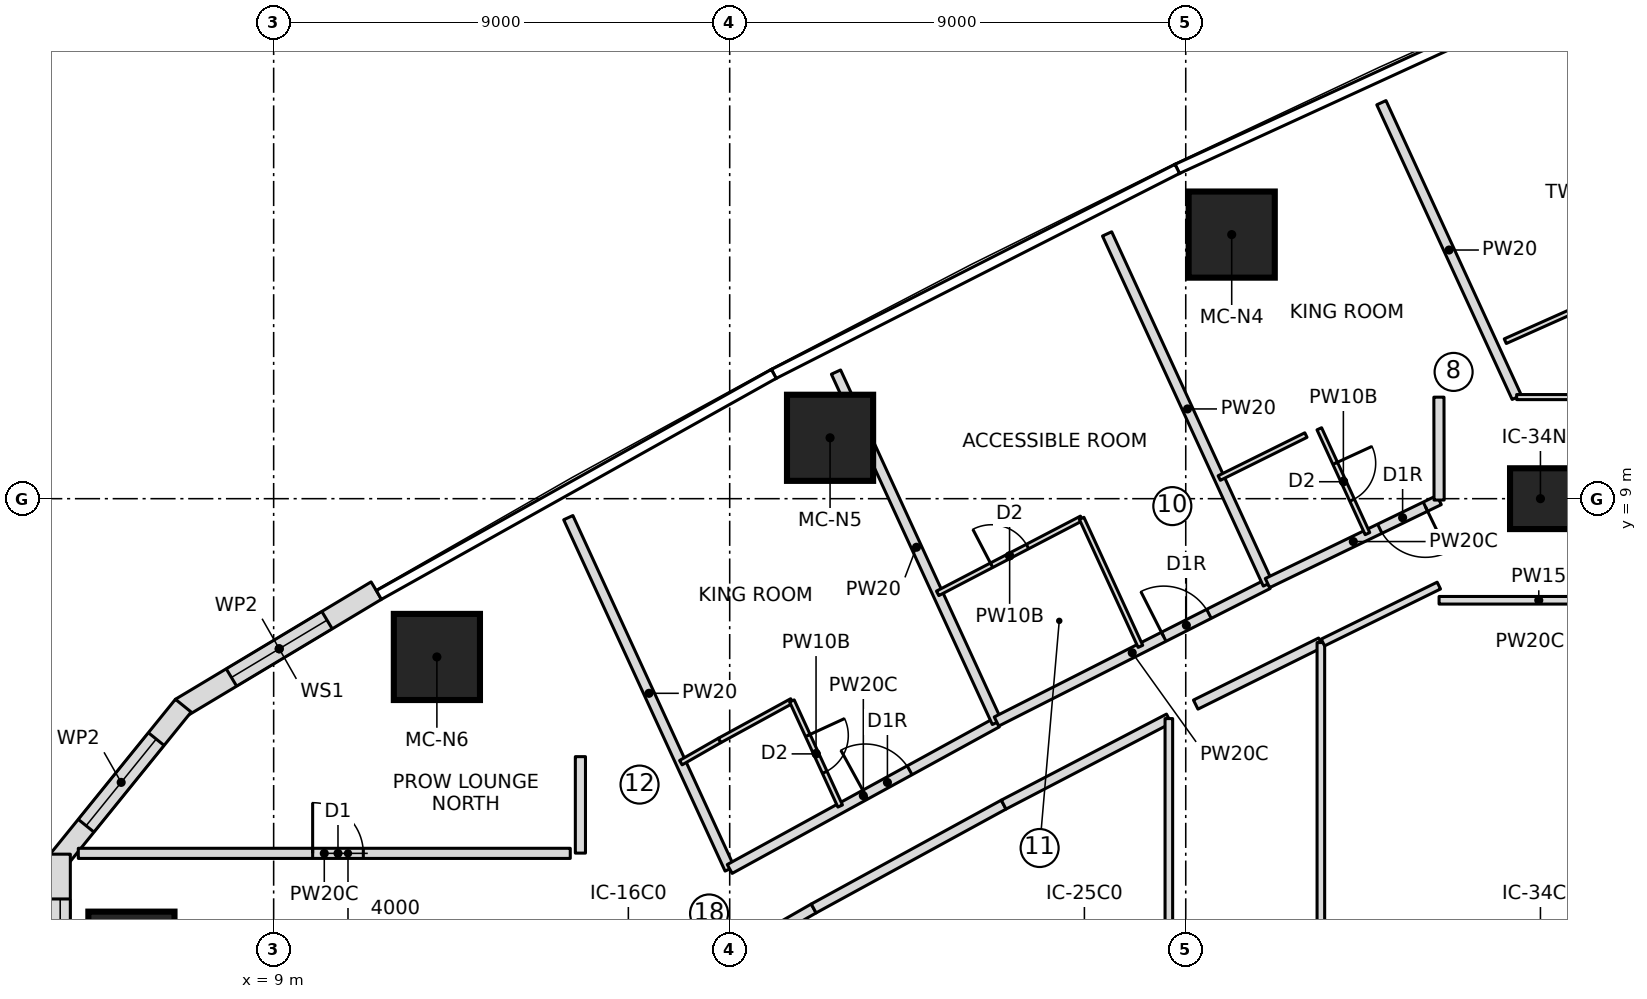
"""IFC4 building model, lengths in metres.
Left out: names, types, materials, properties, quantities, classifications, styles, units other than length and angle.
Written with IfcOpenShell. Run it as: python <this file> out.ifc"""

import sys

from ifc_helpers import new_model, si_unit, direction, frame, frame_2d, origin, origin_2d, place, context, subcontext, project, spatial, polyline, rectangle, outline, extrude, element, fill, save


model = new_model("IFC4")
c1 = context("Model", 3, precision=1e-05, world=origin(), true_north=direction((0.0, 1.0)))
c2 = subcontext(c1, "Body", "Model", "MODEL_VIEW")
j1 = project(units=[si_unit("LENGTHUNIT", "METRE"), si_unit("PLANEANGLEUNIT", "RADIAN")], contexts=[c1])
p1 = place(None, origin())
s1 = spatial("IfcSite", under=j1, at=p1, CompositionType="ELEMENT")
p2 = place(p1, origin())
s2 = spatial("IfcBuilding", under=s1, at=p2, CompositionType="ELEMENT")
p3 = place(p2, frame((0.0, 0.0, 106.2)))
s3 = spatial("IfcBuildingStorey", under=s2, at=p3, CompositionType="ELEMENT", Elevation=106.2)
for number, where, z_axis, x_axis in (
    (1, (6.193, 0.0, 0.0), (0.0, 0.0, 1.0), (1.0, 0.0, 0.0)),
    (2, (27.907, 14.212, 0.0), (0.0, 0.0, 1.0), (1.0, 0.0, 0.0)),
    (3, (19.981, 10.202, 0.0), (0.0, 0.0, 1.0), (1.0, 0.0, 0.0)),
    (4, (12.221, 5.876, 0.0), (0.0, 0.0, 1.0), (1.0, 0.0, 0.0)),
):
    element("IfcColumn", number, at=place(p3, frame(where, z_axis=z_axis, x_axis=x_axis)), inside=s3, PredefinedType="COLUMN", context=c2, shape_type="SweptSolid", body=[
        extrude(rectangle(XDim=1.7, YDim=1.7, at=origin_2d()), origin(), (0.0, 0.0, 1.0), 3.55),
    ])
p4 = place(p3, frame((34.0, 9.0, 0.0), z_axis=(0.0, 0.0, 1.0), x_axis=(1.0, 0.0, 0.0)))
e5 = element("IfcColumn", 5, at=p4, inside=s3, PredefinedType="COLUMN", context=c2, shape_type="SweptSolid", body=[
    extrude(rectangle(XDim=1.2, YDim=1.2, at=origin_2d()), origin(), (0.0, 0.0, 1.0), 3.55),
])
p5 = place(p3, frame((11.026, 7.186, 0.0), z_axis=(0.0, 0.0, 1.0), x_axis=(-0.857550776474, -0.514399325202, 0.0)))
e6 = element("IfcWall", 6, at=p5, inside=s3, PredefinedType="NOTDEFINED", context=c2, shape_type="SweptSolid", body=[
    extrude(outline(polyline([(0.0, -0.2), (4.503, -0.2), (4.433, 0.2), (0.0, 0.2), (0.0, -0.2)])), origin(), (0.0, 0.0, 1.0), 3.25),
])
p6 = place(p5, frame((1.134, 0.0, 0.6)))
e7 = element("IfcOpeningElement", 7, at=p6, cuts=e6, PredefinedType="OPENING", context=c2, shape_type="SweptSolid", body=[
    extrude(outline(polyline([(0.0, 1.35), (0.084, 1.771), (0.322, 2.128), (0.679, 2.366), (1.1, 2.45), (1.521, 2.366), (1.878, 2.128), (2.116, 1.771), (2.2, 1.35), (2.2, 1.1), (2.116, 0.679), (1.878, 0.322), (1.521, 0.084), (1.1, 0.0), (0.679, 0.084), (0.322, 0.322), (0.084, 0.679), (0.0, 1.1), (0.0, 1.35)])), frame((0.0, 0.21, 0.0), z_axis=(0.0, -1.0, 0.0), x_axis=(1.0, 0.0, 0.0)), (0.0, 0.0, 1.0), 0.42),
])
p7 = place(p3, frame((7.194, 4.888, 0.0), z_axis=(0.0, 0.0, 1.0), x_axis=(-0.62903486133, -0.777377092042, 0.0)))
e8 = element("IfcWall", 8, at=p7, inside=s3, PredefinedType="NOTDEFINED", context=c2, shape_type="SweptSolid", body=[
    extrude(outline(polyline([(-0.035, -0.2), (3.897, -0.2), (3.756, 0.2), (0.035, 0.2), (-0.035, -0.2)])), origin(), (0.0, 0.0, 1.0), 3.25),
])
p8 = place(p7, frame((0.813, 0.0, 0.6)))
e9 = element("IfcOpeningElement", 9, at=p8, cuts=e8, PredefinedType="OPENING", context=c2, shape_type="SweptSolid", body=[
    extrude(outline(polyline([(0.0, 1.35), (0.084, 1.771), (0.322, 2.128), (0.679, 2.366), (1.1, 2.45), (1.521, 2.366), (1.878, 2.128), (2.116, 1.771), (2.2, 1.35), (2.2, 1.1), (2.116, 0.679), (1.878, 0.322), (1.521, 0.084), (1.1, 0.0), (0.679, 0.084), (0.322, 0.322), (0.084, 0.679), (0.0, 1.1), (0.0, 1.35)])), frame((0.0, 0.21, 0.0), z_axis=(0.0, -1.0, 0.0), x_axis=(1.0, 0.0, 0.0)), (0.0, 0.0, 1.0), 0.42),
])
p9 = place(p3, frame((4.787, 1.913, 0.0), z_axis=(0.0, 0.0, 1.0), x_axis=(0.0, -1.0, 0.0)))
e10 = element("IfcWall", 10, at=p9, inside=s3, PredefinedType="NOTDEFINED", context=c2, shape_type="SweptSolid", body=[
    extrude(outline(polyline([(-0.071, -0.2), (3.897, -0.2), (3.755, 0.2), (0.071, 0.2), (-0.071, -0.2)])), origin(), (0.0, 0.0, 1.0), 3.25),
])
p10 = place(p9, frame((0.813, 0.0, 0.6)))
e11 = element("IfcOpeningElement", 11, at=p10, cuts=e10, PredefinedType="OPENING", context=c2, shape_type="SweptSolid", body=[
    extrude(outline(polyline([(0.0, 1.35), (0.084, 1.771), (0.322, 2.128), (0.679, 2.366), (1.1, 2.45), (1.521, 2.366), (1.878, 2.128), (2.116, 1.771), (2.2, 1.35), (2.2, 1.1), (2.116, 0.679), (1.878, 0.322), (1.521, 0.084), (1.1, 0.0), (0.679, 0.084), (0.322, 0.322), (0.084, 0.679), (0.0, 1.1), (0.0, 1.35)])), frame((0.0, 0.21, 0.0), z_axis=(0.0, -1.0, 0.0), x_axis=(1.0, 0.0, 0.0)), (0.0, 0.0, 1.0), 0.42),
])
p11 = place(p3, frame((5.145, 2.0, 0.0), z_axis=(0.0, 0.0, 1.0), x_axis=(1.0, 0.0, 0.0)))
e12 = element("IfcWall", 12, at=p11, inside=s3, PredefinedType="PARTITIONING", context=c2, shape_type="SweptSolid", body=[
    extrude(rectangle(XDim=9.709, YDim=0.2, at=frame_2d((4.854, 0.0))), origin(), (0.0, 0.0, 1.0), 3.25),
])
p12 = place(p11, frame((4.625, 0.0, 0.0)))
e13 = element("IfcOpeningElement", 13, at=p12, cuts=e12, PredefinedType="OPENING", context=c2, shape_type="SweptSolid", body=[
    extrude(rectangle(XDim=1.0, YDim=2.1, at=frame_2d((0.5, 1.05))), frame((0.0, 0.11, 0.0), z_axis=(0.0, -1.0, 0.0), x_axis=(1.0, 0.0, 0.0)), (0.0, 0.0, 1.0), 0.22),
])
p13 = place(p3, frame((14.815, 8.626, 0.0), z_axis=(0.0, 0.0, 1.0), x_axis=(0.417432341259, -0.908708006166, 0.0)))
e14 = element("IfcWall", 14, at=p13, inside=s3, PredefinedType="PARTITIONING", context=c2, shape_type="SweptSolid", body=[
    extrude(rectangle(XDim=7.631, YDim=0.2, at=frame_2d((3.815, 0.0))), origin(), (0.0, 0.0, 1.0), 3.25),
])
p14 = place(p3, frame((18.0, 1.692, 0.0), z_axis=(0.0, 0.0, 1.0), x_axis=(0.876809096721, 0.480838650597, 0.0)))
e15 = element("IfcWall", 15, at=p14, inside=s3, PredefinedType="PARTITIONING", context=c2, shape_type="SweptSolid", body=[
    extrude(rectangle(XDim=6.015, YDim=0.2, at=frame_2d((3.008, 0.0))), origin(), (0.0, 0.0, 1.0), 3.25),
])
p15 = place(p14, frame((3.05, 0.0, 0.0)))
e16 = element("IfcOpeningElement", 16, at=p15, cuts=e15, PredefinedType="OPENING", context=c2, shape_type="SweptSolid", body=[
    extrude(rectangle(XDim=1.0, YDim=2.1, at=frame_2d((0.5, 1.05))), frame((0.0, 0.11, 0.0), z_axis=(0.0, -1.0, 0.0), x_axis=(1.0, 0.0, 0.0)), (0.0, 0.0, 1.0), 0.22),
])
p16 = place(p3, frame((17.036, 3.79, 0.0), z_axis=(0.0, 0.0, 1.0), x_axis=(0.867629162742, 0.497211862248, 0.0)))
e17 = element("IfcWall", 17, at=p16, inside=s3, PredefinedType="PARTITIONING", context=c2, shape_type="SweptSolid", body=[
    extrude(rectangle(XDim=0.882, YDim=0.1, at=frame_2d((0.441, 0.0))), origin(), (0.0, 0.0, 1.0), 3.25),
])
p17 = place(p3, frame((17.801, 4.229, 0.0), z_axis=(0.0, 0.0, 1.0), x_axis=(0.877424481957, 0.479714788663, 0.0)))
e18 = element("IfcWall", 18, at=p17, inside=s3, PredefinedType="PARTITIONING", context=c2, shape_type="SweptSolid", body=[
    extrude(rectangle(XDim=1.625, YDim=0.1, at=frame_2d((0.813, 0.0))), origin(), (0.0, 0.0, 1.0), 3.25),
])
p18 = place(p3, frame((19.228, 5.008, 0.0), z_axis=(0.0, 0.0, 1.0), x_axis=(0.417450047292, -0.908699872354, 0.0)))
e19 = element("IfcWall", 19, at=p18, inside=s3, PredefinedType="PARTITIONING", context=c2, shape_type="SweptSolid", body=[
    extrude(rectangle(XDim=2.283, YDim=0.1, at=frame_2d((1.141, 0.0))), origin(), (0.0, 0.0, 1.0), 3.25),
])
p19 = place(p18, frame((0.75, 0.0, 0.0)))
e20 = element("IfcOpeningElement", 20, at=p19, cuts=e19, PredefinedType="OPENING", context=c2, shape_type="SweptSolid", body=[
    extrude(rectangle(XDim=0.8, YDim=2.1, at=frame_2d((0.4, 1.05))), frame((0.0, 0.06, 0.0), z_axis=(0.0, -1.0, 0.0), x_axis=(1.0, 0.0, 0.0)), (0.0, 0.0, 1.0), 0.12),
])
p20 = place(p3, frame((23.274, 4.584, 0.0), z_axis=(0.0, 0.0, 1.0), x_axis=(-0.417440028355, 0.908704474913, 0.0)))
e21 = element("IfcWall", 21, at=p20, inside=s3, PredefinedType="PARTITIONING", context=c2, shape_type="SweptSolid", body=[
    extrude(rectangle(XDim=7.61, YDim=0.2, at=frame_2d((3.805, 0.0))), origin(), (0.0, 0.0, 1.0), 3.25),
])
p21 = place(p3, frame((23.266, 4.602, 0.0), z_axis=(0.0, 0.0, 1.0), x_axis=(0.892007141151, 0.452021304958, 0.0)))
e22 = element("IfcWall", 22, at=p21, inside=s3, PredefinedType="PARTITIONING", context=c2, shape_type="SweptSolid", body=[
    extrude(rectangle(XDim=6.004, YDim=0.2, at=frame_2d((3.002, 0.0))), origin(), (0.0, 0.0, 1.0), 3.25),
])
p22 = place(p21, frame((3.7, 0.0, 0.0)))
e23 = element("IfcOpeningElement", 23, at=p22, cuts=e22, PredefinedType="OPENING", context=c2, shape_type="SweptSolid", body=[
    extrude(rectangle(XDim=1.0, YDim=2.1, at=frame_2d((0.5, 1.05))), frame((0.0, 0.11, 0.0), z_axis=(0.0, -1.0, 0.0), x_axis=(1.0, 0.0, 0.0)), (0.0, 0.0, 1.0), 0.22),
])
p23 = place(p3, frame((22.104, 7.132, 0.0), z_axis=(0.0, 0.0, 1.0), x_axis=(0.886865947566, 0.46202682936, 0.0)))
e24 = element("IfcWall", 24, at=p23, inside=s3, PredefinedType="PARTITIONING", context=c2, shape_type="SweptSolid", body=[
    extrude(rectangle(XDim=3.204, YDim=0.1, at=frame_2d((1.602, 0.0))), origin(), (0.0, 0.0, 1.0), 3.25),
])
p24 = place(p23, frame((1.2, 0.0, 0.0)))
e25 = element("IfcOpeningElement", 25, at=p24, cuts=e24, PredefinedType="OPENING", context=c2, shape_type="SweptSolid", body=[
    extrude(rectangle(XDim=0.8, YDim=2.1, at=frame_2d((0.4, 1.05))), frame((0.0, 0.06, 0.0), z_axis=(0.0, -1.0, 0.0), x_axis=(1.0, 0.0, 0.0)), (0.0, 0.0, 1.0), 0.12),
])
p25 = place(p3, frame((24.945, 8.612, 0.0), z_axis=(0.0, 0.0, 1.0), x_axis=(0.417431588167, -0.908708352113, 0.0)))
e26 = element("IfcWall", 26, at=p25, inside=s3, PredefinedType="PARTITIONING", context=c2, shape_type="SweptSolid", body=[
    extrude(rectangle(XDim=2.781, YDim=0.1, at=frame_2d((1.39, 0.0))), origin(), (0.0, 0.0, 1.0), 3.25),
])
p26 = place(p3, frame((28.622, 7.316, 0.0), z_axis=(0.0, 0.0, 1.0), x_axis=(-0.417428513692, 0.908709764422, 0.0)))
e27 = element("IfcWall", 27, at=p26, inside=s3, PredefinedType="PARTITIONING", context=c2, shape_type="SweptSolid", body=[
    extrude(rectangle(XDim=7.603, YDim=0.2, at=frame_2d((3.802, 0.0))), origin(), (0.0, 0.0, 1.0), 3.25),
])
p27 = place(p3, frame((32.0, 8.973, 0.0), z_axis=(0.0, 0.0, 1.0), x_axis=(-0.900216696569, -0.435442188147, 0.0)))
e28 = element("IfcWall", 28, at=p27, inside=s3, PredefinedType="PARTITIONING", context=c2, shape_type="SweptSolid", body=[
    extrude(rectangle(XDim=3.762, YDim=0.2, at=frame_2d((1.881, 0.0))), origin(), (0.0, 0.0, 1.0), 3.25),
])
p28 = place(p27, frame((0.3, 0.0, 0.0)))
e29 = element("IfcOpeningElement", 29, at=p28, cuts=e28, PredefinedType="OPENING", context=c2, shape_type="SweptSolid", body=[
    extrude(rectangle(XDim=1.0, YDim=2.1, at=frame_2d((0.5, 1.05))), frame((0.0, 0.11, 0.0), z_axis=(0.0, -1.0, 0.0), x_axis=(1.0, 0.0, 0.0)), (0.0, 0.0, 1.0), 0.22),
])
p29 = place(p3, frame((27.661, 9.407, 0.0), z_axis=(0.0, 0.0, 1.0), x_axis=(0.895982200486, 0.444089964324, 0.0)))
e30 = element("IfcWall", 30, at=p29, inside=s3, PredefinedType="PARTITIONING", context=c2, shape_type="SweptSolid", body=[
    extrude(rectangle(XDim=1.909, YDim=0.1, at=frame_2d((0.954, 0.0))), origin(), (0.0, 0.0, 1.0), 3.25),
])
p30 = place(p3, frame((29.635, 10.38, 0.0), z_axis=(0.0, 0.0, 1.0), x_axis=(0.417466676952, -0.908692232626, 0.0)))
e31 = element("IfcWall", 31, at=p30, inside=s3, PredefinedType="PARTITIONING", context=c2, shape_type="SweptSolid", body=[
    extrude(rectangle(XDim=2.277, YDim=0.1, at=frame_2d((1.139, 0.0))), origin(), (0.0, 0.0, 1.0), 3.25),
])
p31 = place(p30, frame((0.75, 0.0, 0.0)))
e32 = element("IfcOpeningElement", 32, at=p31, cuts=e31, PredefinedType="OPENING", context=c2, shape_type="SweptSolid", body=[
    extrude(rectangle(XDim=0.8, YDim=2.1, at=frame_2d((0.4, 1.05))), frame((0.0, 0.06, 0.0), z_axis=(0.0, -1.0, 0.0), x_axis=(1.0, 0.0, 0.0)), (0.0, 0.0, 1.0), 0.12),
])
p32 = place(p3, frame((33.532, 11.0, 0.0), z_axis=(0.0, 0.0, 1.0), x_axis=(-0.417441426461, 0.908703832651, 0.0)))
e33 = element("IfcWall", 33, at=p32, inside=s3, PredefinedType="PARTITIONING", context=c2, shape_type="SweptSolid", body=[
    extrude(rectangle(XDim=6.399, YDim=0.2, at=frame_2d((3.2, 0.0))), origin(), (0.0, 0.0, 1.0), 3.25),
])
p33 = place(p3, frame((33.306, 12.108, 0.0), z_axis=(0.0, 0.0, 1.0), x_axis=(0.913060453705, 0.407824236504, 0.0)))
e34 = element("IfcWall", 34, at=p33, inside=s3, PredefinedType="PARTITIONING", context=c2, shape_type="SweptSolid", body=[
    extrude(rectangle(XDim=2.243, YDim=0.1, at=frame_2d((1.122, 0.0))), origin(), (0.0, 0.0, 1.0), 3.25),
])
p34 = place(p3, frame((18.065, 0.0, 0.0), z_axis=(0.0, 0.0, 1.0), x_axis=(0.867694156962, 0.49709843087, 0.0)))
e35 = element("IfcWall", 35, at=p34, inside=s3, PredefinedType="PARTITIONING", context=c2, shape_type="SweptSolid", body=[
    extrude(rectangle(XDim=1.835, YDim=0.2, at=frame_2d((0.918, 0.0))), origin(), (0.0, 0.0, 1.0), 3.25),
])
p35 = place(p3, frame((19.657, 0.912, 0.0), z_axis=(0.0, 0.0, 1.0), x_axis=(0.877465075585, 0.479640533242, 0.0)))
e36 = element("IfcWall", 36, at=p35, inside=s3, PredefinedType="PARTITIONING", context=c2, shape_type="SweptSolid", body=[
    extrude(rectangle(XDim=4.273, YDim=0.2, at=frame_2d((2.137, 0.0))), origin(), (0.0, 0.0, 1.0), 3.25),
])
p36 = place(p3, frame((23.407, 2.962, 0.0), z_axis=(0.0, 0.0, 1.0), x_axis=(0.886891405098, 0.46197796004, 0.0)))
e37 = element("IfcWall", 37, at=p36, inside=s3, PredefinedType="PARTITIONING", context=c2, shape_type="SweptSolid", body=[
    extrude(rectangle(XDim=3.676, YDim=0.2, at=frame_2d((1.838, 0.0))), origin(), (0.0, 0.0, 1.0), 3.25),
])
p37 = place(p3, frame((26.667, -4.66, 0.0), z_axis=(0.0, 0.0, 1.0), x_axis=(0.0, 1.0, 0.0)))
e38 = element("IfcWall", 38, at=p37, inside=s3, PredefinedType="PARTITIONING", context=c2, shape_type="SweptSolid", body=[
    extrude(rectangle(XDim=9.32, YDim=0.15, at=frame_2d((4.66, 0.0))), origin(), (0.0, 0.0, 1.0), 3.25),
])
p38 = place(p3, frame((27.196, 4.936, 0.0), z_axis=(0.0, 0.0, 1.0), x_axis=(0.895945057464, 0.444164895062, 0.0)))
e39 = element("IfcWall", 39, at=p38, inside=s3, PredefinedType="PARTITIONING", context=c2, shape_type="SweptSolid", body=[
    extrude(rectangle(XDim=2.757, YDim=0.2, at=frame_2d((1.378, 0.0))), origin(), (0.0, 0.0, 1.0), 3.25),
])
p39 = place(p3, frame((29.667, -6.16, 0.0), z_axis=(0.0, 0.0, 1.0), x_axis=(0.0, 1.0, 0.0)))
e40 = element("IfcWall", 40, at=p39, inside=s3, PredefinedType="PARTITIONING", context=c2, shape_type="SweptSolid", body=[
    extrude(rectangle(XDim=12.321, YDim=0.15, at=frame_2d((6.16, 0.0))), origin(), (0.0, 0.0, 1.0), 3.25),
])
p40 = place(p3, frame((36.0, 11.005, 0.0), z_axis=(0.0, 0.0, 1.0), x_axis=(-1.0, 0.0, 0.0)))
e41 = element("IfcWall", 41, at=p40, inside=s3, PredefinedType="PARTITIONING", context=c2, shape_type="SweptSolid", body=[
    extrude(rectangle(XDim=2.47, YDim=0.1, at=frame_2d((1.235, 0.0))), origin(), (0.0, 0.0, 1.0), 3.25),
])
p41 = place(p3, frame((29.707, 6.162, 0.0), z_axis=(0.0, 0.0, 1.0), x_axis=(0.89773510237, 0.440535680702, 0.0)))
e42 = element("IfcWall", 42, at=p41, inside=s3, PredefinedType="PARTITIONING", context=c2, shape_type="SweptSolid", body=[
    extrude(rectangle(XDim=2.549, YDim=0.15, at=frame_2d((1.275, 0.0))), origin(), (0.0, 0.0, 1.0), 3.25),
])
p42 = place(p3, frame((32.0, 6.995, 0.0), z_axis=(0.0, 0.0, 1.0), x_axis=(1.0, 0.0, 0.0)))
e43 = element("IfcWall", 43, at=p42, inside=s3, PredefinedType="PARTITIONING", context=c2, shape_type="SweptSolid", body=[
    extrude(rectangle(XDim=3.935, YDim=0.15, at=frame_2d((1.968, 0.0))), origin(), (0.0, 0.0, 1.0), 3.25),
])
p43 = place(p3, frame((15.054, 3.909, 0.0), z_axis=(0.0, 0.0, 1.0), x_axis=(0.0, -1.0, 0.0)))
e44 = element("IfcWall", 44, at=p43, inside=s3, PredefinedType="PARTITIONING", context=c2, shape_type="SweptSolid", body=[
    extrude(rectangle(XDim=1.904, YDim=0.2, at=frame_2d((0.952, 0.0))), origin(), (0.0, 0.0, 1.0), 3.25),
])
p44 = place(p3, frame((31.997, 11.003, 0.0), z_axis=(0.0, 0.0, 1.0), x_axis=(0.001683296882, -0.999998583255, 0.0)))
e45 = element("IfcWall", 45, at=p44, inside=s3, PredefinedType="PARTITIONING", context=c2, shape_type="SweptSolid", body=[
    extrude(rectangle(XDim=2.031, YDim=0.2, at=frame_2d((1.015, 0.0))), origin(), (0.0, 0.0, 1.0), 3.25),
])
p45 = place(p6, origin())
e46 = element("IfcWindow", 46, at=p45, inside=s3, PartitioningType="SINGLE_PANEL", PredefinedType="WINDOW", context=c2, shape_type="SweptSolid", body=[
    extrude(outline(polyline([(0.0, 1.35), (0.084, 1.771), (0.322, 2.128), (0.679, 2.366), (1.1, 2.45), (1.521, 2.366), (1.878, 2.128), (2.116, 1.771), (2.2, 1.35), (2.2, 1.1), (2.116, 0.679), (1.878, 0.322), (1.521, 0.084), (1.1, 0.0), (0.679, 0.084), (0.322, 0.322), (0.084, 0.679), (0.0, 1.1), (0.0, 1.35)])), frame((0.0, 0.17, 0.0), z_axis=(0.0, -1.0, 0.0), x_axis=(1.0, 0.0, 0.0)), (0.0, 0.0, 1.0), 0.06),
])
fill(e7, e46)
p46 = place(p8, origin())
e47 = element("IfcWindow", 47, at=p46, inside=s3, PartitioningType="SINGLE_PANEL", PredefinedType="WINDOW", context=c2, shape_type="SweptSolid", body=[
    extrude(outline(polyline([(0.0, 1.35), (0.084, 1.771), (0.322, 2.128), (0.679, 2.366), (1.1, 2.45), (1.521, 2.366), (1.878, 2.128), (2.116, 1.771), (2.2, 1.35), (2.2, 1.1), (2.116, 0.679), (1.878, 0.322), (1.521, 0.084), (1.1, 0.0), (0.679, 0.084), (0.322, 0.322), (0.084, 0.679), (0.0, 1.1), (0.0, 1.35)])), frame((0.0, 0.17, 0.0), z_axis=(0.0, -1.0, 0.0), x_axis=(1.0, 0.0, 0.0)), (0.0, 0.0, 1.0), 0.06),
])
fill(e9, e47)
p47 = place(p10, origin())
e48 = element("IfcWindow", 48, at=p47, inside=s3, PartitioningType="SINGLE_PANEL", PredefinedType="WINDOW", context=c2, shape_type="SweptSolid", body=[
    extrude(outline(polyline([(0.0, 1.35), (0.084, 1.771), (0.322, 2.128), (0.679, 2.366), (1.1, 2.45), (1.521, 2.366), (1.878, 2.128), (2.116, 1.771), (2.2, 1.35), (2.2, 1.1), (2.116, 0.679), (1.878, 0.322), (1.521, 0.084), (1.1, 0.0), (0.679, 0.084), (0.322, 0.322), (0.084, 0.679), (0.0, 1.1), (0.0, 1.35)])), frame((0.0, 0.17, 0.0), z_axis=(0.0, -1.0, 0.0), x_axis=(1.0, 0.0, 0.0)), (0.0, 0.0, 1.0), 0.06),
])
fill(e11, e48)
p48 = place(p12, origin())
e49 = element("IfcDoor", 49, at=p48, inside=s3, OperationType="SINGLE_SWING_LEFT", PredefinedType="DOOR", context=c2, shape_type="SweptSolid", body=[
    extrude(rectangle(XDim=1.0, YDim=2.1, at=frame_2d((0.5, 1.05))), frame((0.0, 0.025, 0.0), z_axis=(0.0, -1.0, 0.0), x_axis=(1.0, 0.0, 0.0)), (0.0, 0.0, 1.0), 0.05),
])
fill(e13, e49)
p49 = place(p19, origin())
e50 = element("IfcDoor", 50, at=p49, inside=s3, OperationType="SINGLE_SWING_LEFT", PredefinedType="DOOR", context=c2, shape_type="SweptSolid", body=[
    extrude(rectangle(XDim=0.8, YDim=2.1, at=frame_2d((0.4, 1.05))), frame((0.0, 0.025, 0.0), z_axis=(0.0, -1.0, 0.0), x_axis=(1.0, 0.0, 0.0)), (0.0, 0.0, 1.0), 0.05),
])
fill(e20, e50)
p50 = place(p15, origin())
e51 = element("IfcDoor", 51, at=p50, inside=s3, OperationType="SINGLE_SWING_RIGHT", PredefinedType="DOOR", context=c2, shape_type="SweptSolid", body=[
    extrude(rectangle(XDim=1.0, YDim=2.1, at=frame_2d((0.5, 1.05))), frame((0.0, 0.025, 0.0), z_axis=(0.0, -1.0, 0.0), x_axis=(1.0, 0.0, 0.0)), (0.0, 0.0, 1.0), 0.05),
])
fill(e16, e51)
p51 = place(p24, origin())
e52 = element("IfcDoor", 52, at=p51, inside=s3, OperationType="SINGLE_SWING_LEFT", PredefinedType="DOOR", context=c2, shape_type="SweptSolid", body=[
    extrude(rectangle(XDim=0.8, YDim=2.1, at=frame_2d((0.4, 1.05))), frame((0.0, 0.025, 0.0), z_axis=(0.0, -1.0, 0.0), x_axis=(1.0, 0.0, 0.0)), (0.0, 0.0, 1.0), 0.05),
])
fill(e25, e52)
p52 = place(p22, origin())
e53 = element("IfcDoor", 53, at=p52, inside=s3, OperationType="SINGLE_SWING_RIGHT", PredefinedType="DOOR", context=c2, shape_type="SweptSolid", body=[
    extrude(rectangle(XDim=1.0, YDim=2.1, at=frame_2d((0.5, 1.05))), frame((0.0, 0.025, 0.0), z_axis=(0.0, -1.0, 0.0), x_axis=(1.0, 0.0, 0.0)), (0.0, 0.0, 1.0), 0.05),
])
fill(e23, e53)
p53 = place(p31, origin())
e54 = element("IfcDoor", 54, at=p53, inside=s3, OperationType="SINGLE_SWING_LEFT", PredefinedType="DOOR", context=c2, shape_type="SweptSolid", body=[
    extrude(rectangle(XDim=0.8, YDim=2.1, at=frame_2d((0.4, 1.05))), frame((0.0, 0.025, 0.0), z_axis=(0.0, -1.0, 0.0), x_axis=(1.0, 0.0, 0.0)), (0.0, 0.0, 1.0), 0.05),
])
fill(e32, e54)
p54 = place(p28, origin())
e55 = element("IfcDoor", 55, at=p54, inside=s3, OperationType="SINGLE_SWING_RIGHT", PredefinedType="DOOR", context=c2, shape_type="SweptSolid", body=[
    extrude(rectangle(XDim=1.0, YDim=2.1, at=frame_2d((0.5, 1.05))), frame((0.0, 0.025, 0.0), z_axis=(0.0, -1.0, 0.0), x_axis=(1.0, 0.0, 0.0)), (0.0, 0.0, 1.0), 0.05),
])
fill(e29, e55)
save(model, sys.argv[1])
